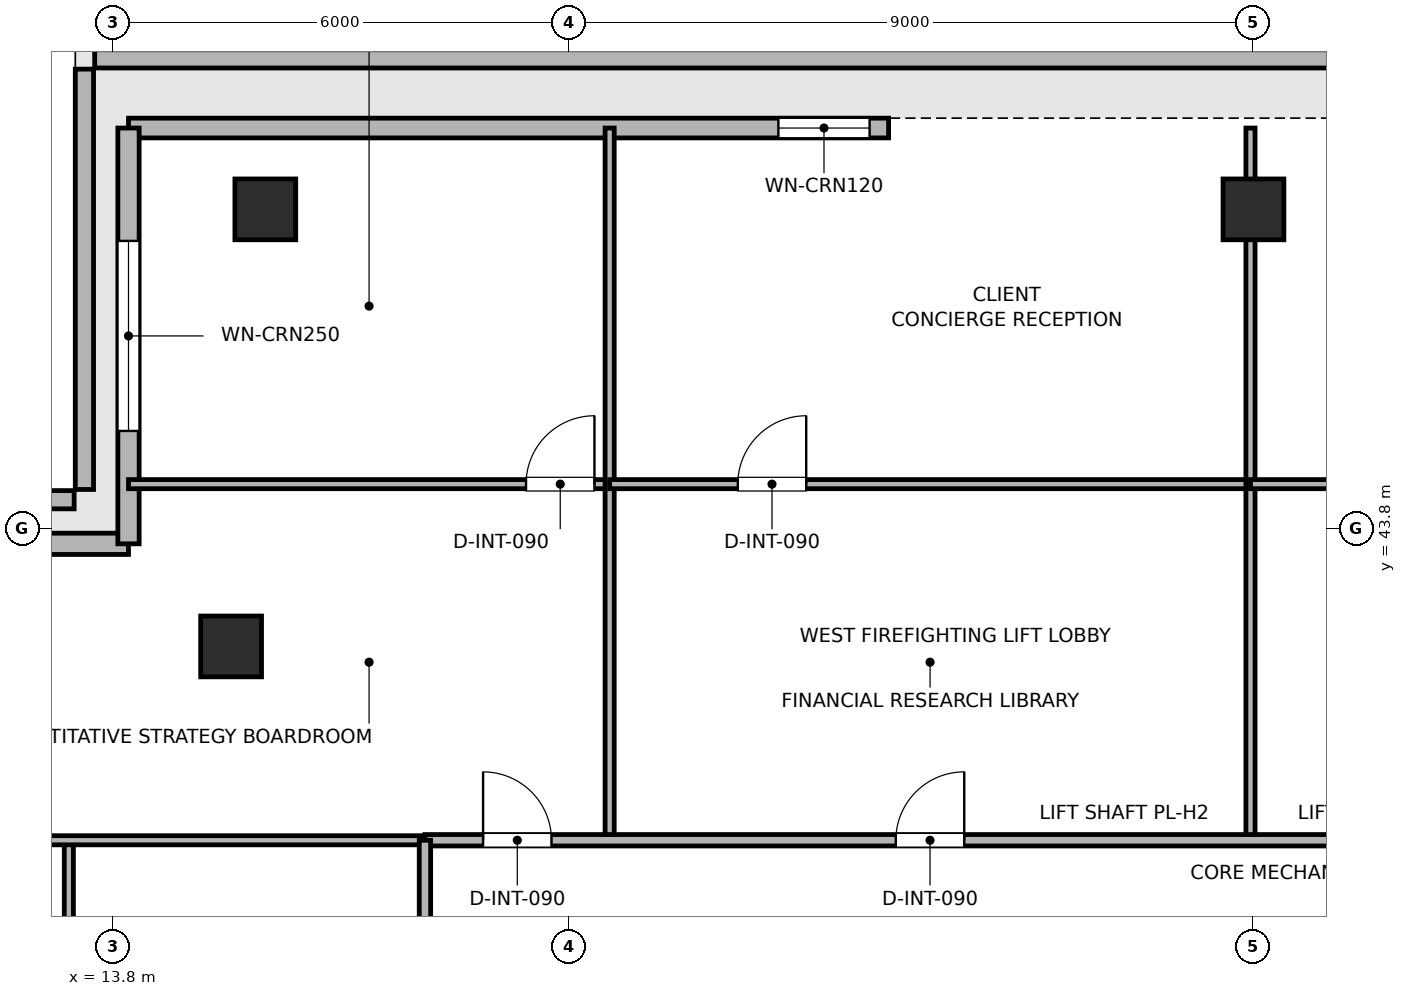
"""IFC4 building model, lengths in metres.
Left out: names, types, materials, properties, quantities, classifications, styles, units other than length and angle.
Written with IfcOpenShell. Run it as: python <this file> out.ifc"""

import sys

from ifc_helpers import new_model, si_unit, direction, frame, frame_2d, origin, origin_2d, place, context, subcontext, project, spatial, rectangle, extrude, element, fill, save


model = new_model("IFC4")
c1 = context("Model", 3, precision=1e-05, world=origin(), true_north=direction((0.0, 1.0)))
c2 = subcontext(c1, "Body", "Model", "MODEL_VIEW")
j1 = project(units=[si_unit("LENGTHUNIT", "METRE"), si_unit("PLANEANGLEUNIT", "RADIAN")], contexts=[c1])
p1 = place(None, origin())
s1 = spatial("IfcSite", under=j1, at=p1, CompositionType="ELEMENT")
p2 = place(p1, origin())
s2 = spatial("IfcBuilding", under=s1, at=p2, CompositionType="ELEMENT")
p3 = place(p2, frame((0.0, 0.0, 355.5)))
s3 = spatial("IfcBuildingStorey", under=s2, at=p3, CompositionType="ELEMENT", Elevation=355.5)
for number, where, z_axis, x_axis in (
    (1, (28.8, 48.0, 0.003), (0.0, 0.0, 1.0), (1.0, 0.0, 0.0)),
    (2, (15.8, 48.0, 0.003), (0.0, 0.0, 1.0), (1.0, 0.0, 0.0)),
    (3, (15.35, 42.25, 0.003), (0.0, 0.0, 1.0), (1.0, 0.0, 0.0)),
):
    element("IfcColumn", number, at=place(p3, frame(where, z_axis=z_axis, x_axis=x_axis)), inside=s3, PredefinedType="COLUMN", context=c2, shape_type="SweptSolid", body=[
        extrude(rectangle(XDim=0.8, YDim=0.8, at=origin_2d()), origin(), (0.0, 0.0, 1.0), 4.234),
    ])
p4 = place(p3, frame((44.045, 49.98, 0.0), z_axis=(0.0, 0.0, 1.0), x_axis=(-1.0, 0.0, 0.0)))
e4 = element("IfcWall", 4, at=p4, inside=s3, PredefinedType="PARAPET", context=c2, shape_type="SweptSolid", body=[
    extrude(rectangle(XDim=30.49, YDim=0.24, at=frame_2d((15.245, 0.0))), origin(), (0.0, 0.0, 1.0), 1.2),
])
for number, where, z_axis, x_axis in (
    (5, (13.42, 49.845, 0.0), (0.0, 0.0, 1.0), (0.0, -1.0, 0.0)),
    (6, (13.285, 44.18, 0.0), (0.0, 0.0, 1.0), (-1.0, 0.0, 0.0)),
):
    element("IfcWall", number, at=place(p3, frame(where, z_axis=z_axis, x_axis=x_axis)), inside=s3, PredefinedType="PARAPET", context=c2, shape_type="SweptSolid", body=[
        extrude(rectangle(XDim=5.53, YDim=0.24, at=frame_2d((2.765, 0.0))), origin(), (0.0, 0.0, 1.0), 1.2),
    ])
p5 = place(p3, frame((14.0, 49.07, 0.0), z_axis=(0.0, 0.0, 1.0), x_axis=(1.0, 0.0, 0.0)))
e7 = element("IfcWall", 7, at=p5, inside=s3, PredefinedType="SOLIDWALL", context=c2, shape_type="SweptSolid", body=[
    extrude(rectangle(XDim=10.0, YDim=0.26, at=frame_2d((5.0, 0.0))), origin(), (0.0, 0.0, 1.0), 4.24),
])
p6 = place(p5, frame((8.55, 0.0, 0.9)))
e8 = element("IfcOpeningElement", 8, at=p6, cuts=e7, PredefinedType="OPENING", context=c2, shape_type="SweptSolid", body=[
    extrude(rectangle(XDim=1.2, YDim=2.1, at=frame_2d((0.6, 1.05))), frame((0.0, 0.14, 0.0), z_axis=(0.0, -1.0, 0.0), x_axis=(1.0, 0.0, 0.0)), (0.0, 0.0, 1.0), 0.28),
])
p7 = place(p3, frame((8.53, 43.6, 0.0), z_axis=(0.0, 0.0, 1.0), x_axis=(1.0, 0.0, 0.0)))
e9 = element("IfcWall", 9, at=p7, inside=s3, PredefinedType="SOLIDWALL", context=c2, shape_type="SweptSolid", body=[
    extrude(rectangle(XDim=5.47, YDim=0.28, at=frame_2d((2.735, 0.0))), origin(), (0.0, 0.0, 1.0), 4.24),
])
p8 = place(p7, frame((1.485, 0.0, 0.9)))
e10 = element("IfcOpeningElement", 10, at=p8, cuts=e9, PredefinedType="OPENING", context=c2, shape_type="SweptSolid", body=[
    extrude(rectangle(XDim=2.5, YDim=1.9, at=frame_2d((1.25, 0.95))), frame((0.0, 0.15, 0.0), z_axis=(0.0, -1.0, 0.0), x_axis=(1.0, 0.0, 0.0)), (0.0, 0.0, 1.0), 0.3),
])
p9 = place(p3, frame((14.0, 43.6, 0.0), z_axis=(0.0, 0.0, 1.0), x_axis=(0.0, 1.0, 0.0)))
e11 = element("IfcWall", 11, at=p9, inside=s3, PredefinedType="SOLIDWALL", context=c2, shape_type="SweptSolid", body=[
    extrude(rectangle(XDim=5.47, YDim=0.28, at=frame_2d((2.735, 0.0))), origin(), (0.0, 0.0, 1.0), 4.24),
])
p10 = place(p9, frame((1.485, 0.0, 0.9)))
e12 = element("IfcOpeningElement", 12, at=p10, cuts=e11, PredefinedType="OPENING", context=c2, shape_type="SweptSolid", body=[
    extrude(rectangle(XDim=2.5, YDim=1.9, at=frame_2d((1.25, 0.95))), frame((0.0, 0.15, 0.0), z_axis=(0.0, -1.0, 0.0), x_axis=(1.0, 0.0, 0.0)), (0.0, 0.0, 1.0), 0.3),
])
p11 = place(p3, frame((14.0, 44.385, 0.0), z_axis=(0.0, 0.0, 1.0), x_axis=(1.0, 0.0, 0.0)))
e13 = element("IfcWall", 13, at=p11, inside=s3, PredefinedType="PARTITIONING", context=c2, shape_type="SweptSolid", body=[
    extrude(rectangle(XDim=6.33, YDim=0.12, at=frame_2d((3.165, 0.0))), origin(), (0.0, 0.0, 1.0), 3.825),
])
p12 = place(p11, frame((5.23, 0.0, 0.0)))
e14 = element("IfcOpeningElement", 14, at=p12, cuts=e13, PredefinedType="OPENING", context=c2, shape_type="SweptSolid", body=[
    extrude(rectangle(XDim=0.9, YDim=2.1, at=frame_2d((0.45, 1.05))), frame((0.0, 0.07, 0.0), z_axis=(0.0, -1.0, 0.0), x_axis=(1.0, 0.0, 0.0)), (0.0, 0.0, 1.0), 0.14),
])
p13 = place(p3, frame((20.33, 39.7, 0.0), z_axis=(0.0, 0.0, 1.0), x_axis=(0.0, 1.0, 0.0)))
e15 = element("IfcWall", 15, at=p13, inside=s3, PredefinedType="PARTITIONING", context=c2, shape_type="SweptSolid", body=[
    extrude(rectangle(XDim=9.37, YDim=0.12, at=frame_2d((4.685, 0.0))), origin(), (0.0, 0.0, 1.0), 3.825),
])
p14 = place(p3, frame((20.33, 44.385, 0.0), z_axis=(0.0, 0.0, 1.0), x_axis=(1.0, 0.0, 0.0)))
e16 = element("IfcWall", 16, at=p14, inside=s3, PredefinedType="PARTITIONING", context=c2, shape_type="SweptSolid", body=[
    extrude(rectangle(XDim=8.431, YDim=0.12, at=frame_2d((4.215, 0.0))), origin(), (0.0, 0.0, 1.0), 3.825),
])
p15 = place(p14, frame((1.686, 0.0, 0.0)))
e17 = element("IfcOpeningElement", 17, at=p15, cuts=e16, PredefinedType="OPENING", context=c2, shape_type="SweptSolid", body=[
    extrude(rectangle(XDim=0.9, YDim=2.1, at=frame_2d((0.45, 1.05))), frame((0.0, 0.07, 0.0), z_axis=(0.0, -1.0, 0.0), x_axis=(1.0, 0.0, 0.0)), (0.0, 0.0, 1.0), 0.14),
])
p16 = place(p3, frame((28.761, 39.7, 0.0), z_axis=(0.0, 0.0, 1.0), x_axis=(0.0, 1.0, 0.0)))
e18 = element("IfcWall", 18, at=p16, inside=s3, PredefinedType="PARTITIONING", context=c2, shape_type="SweptSolid", body=[
    extrude(rectangle(XDim=9.37, YDim=0.12, at=frame_2d((4.685, 0.0))), origin(), (0.0, 0.0, 1.0), 3.825),
])
p17 = place(p3, frame((28.761, 44.385, 0.0), z_axis=(0.0, 0.0, 1.0), x_axis=(1.0, 0.0, 0.0)))
e19 = element("IfcWall", 19, at=p17, inside=s3, PredefinedType="PARTITIONING", context=c2, shape_type="SweptSolid", body=[
    extrude(rectangle(XDim=14.839, YDim=0.12, at=frame_2d((7.419, 0.0))), origin(), (0.0, 0.0, 1.0), 3.825),
])
p18 = place(p17, frame((5.841, 0.0, 0.0)))
e20 = element("IfcOpeningElement", 20, at=p18, cuts=e19, PredefinedType="OPENING", context=c2, shape_type="SweptSolid", body=[
    extrude(rectangle(XDim=0.9, YDim=2.1, at=frame_2d((0.45, 1.05))), frame((0.0, 0.07, 0.0), z_axis=(0.0, -1.0, 0.0), x_axis=(1.0, 0.0, 0.0)), (0.0, 0.0, 1.0), 0.14),
])
p19 = place(p3, frame((13.215, 14.0, 0.0), z_axis=(0.0, 0.0, 1.0), x_axis=(0.0, 1.0, 0.0)))
e21 = element("IfcWall", 21, at=p19, inside=s3, PredefinedType="PARTITIONING", context=c2, shape_type="SweptSolid", body=[
    extrude(rectangle(XDim=25.7, YDim=0.12, at=frame_2d((12.85, 0.0))), origin(), (0.0, 0.0, 1.0), 3.825),
])
p20 = place(p19, frame((20.533, 0.0, 0.0)))
e22 = element("IfcOpeningElement", 22, at=p20, cuts=e21, PredefinedType="OPENING", context=c2, shape_type="SweptSolid", body=[
    extrude(rectangle(XDim=0.9, YDim=2.1, at=frame_2d((0.45, 1.05))), frame((0.0, 0.07, 0.0), z_axis=(0.0, -1.0, 0.0), x_axis=(1.0, 0.0, 0.0)), (0.0, 0.0, 1.0), 0.14),
])
p21 = place(p3, frame((8.53, 39.7, 0.0), z_axis=(0.0, 0.0, 1.0), x_axis=(1.0, 0.0, 0.0)))
e23 = element("IfcWall", 23, at=p21, inside=s3, PredefinedType="PARTITIONING", context=c2, shape_type="SweptSolid", body=[
    extrude(rectangle(XDim=9.37, YDim=0.12, at=frame_2d((4.685, 0.0))), origin(), (0.0, 0.0, 1.0), 3.825),
])
p22 = place(p3, frame((17.9, 39.7, 0.0), z_axis=(0.0, 0.0, 1.0), x_axis=(1.0, 0.0, 0.0)))
e24 = element("IfcWall", 24, at=p22, inside=s3, PredefinedType="PARTITIONING", context=c2, shape_type="SweptSolid", body=[
    extrude(rectangle(XDim=21.8, YDim=0.15, at=frame_2d((10.9, 0.0))), origin(), (0.0, 0.0, 1.0), 3.825),
])
p23 = place(p22, frame((0.765, 0.0, 0.0)))
e25 = element("IfcOpeningElement", 25, at=p23, cuts=e24, PredefinedType="OPENING", context=c2, shape_type="SweptSolid", body=[
    extrude(rectangle(XDim=0.9, YDim=2.1, at=frame_2d((0.45, 1.05))), frame((0.0, 0.085, 0.0), z_axis=(0.0, -1.0, 0.0), x_axis=(1.0, 0.0, 0.0)), (0.0, 0.0, 1.0), 0.17),
])
p24 = place(p22, frame((6.195, 0.0, 0.0)))
e26 = element("IfcOpeningElement", 26, at=p24, cuts=e24, PredefinedType="OPENING", context=c2, shape_type="SweptSolid", body=[
    extrude(rectangle(XDim=0.9, YDim=2.1, at=frame_2d((0.45, 1.05))), frame((0.0, 0.085, 0.0), z_axis=(0.0, -1.0, 0.0), x_axis=(1.0, 0.0, 0.0)), (0.0, 0.0, 1.0), 0.17),
])
p25 = place(p22, frame((15.88, 0.0, 0.0)))
e27 = element("IfcOpeningElement", 27, at=p25, cuts=e24, PredefinedType="OPENING", context=c2, shape_type="SweptSolid", body=[
    extrude(rectangle(XDim=0.9, YDim=2.1, at=frame_2d((0.45, 1.05))), frame((0.0, 0.085, 0.0), z_axis=(0.0, -1.0, 0.0), x_axis=(1.0, 0.0, 0.0)), (0.0, 0.0, 1.0), 0.17),
])
p26 = place(p3, frame((17.9, 14.0, 0.0), z_axis=(0.0, 0.0, 1.0), x_axis=(0.0, 1.0, 0.0)))
e28 = element("IfcWall", 28, at=p26, inside=s3, PredefinedType="PARTITIONING", context=c2, shape_type="SweptSolid", body=[
    extrude(rectangle(XDim=25.7, YDim=0.15, at=frame_2d((12.85, 0.0))), origin(), (0.0, 0.0, 1.0), 3.825),
])
p27 = place(p26, frame((12.4, 0.0, 0.0)))
e29 = element("IfcOpeningElement", 29, at=p27, cuts=e28, PredefinedType="OPENING", context=c2, shape_type="SweptSolid", body=[
    extrude(rectangle(XDim=0.9, YDim=2.1, at=frame_2d((0.45, 1.05))), frame((0.0, 0.085, 0.0), z_axis=(0.0, -1.0, 0.0), x_axis=(1.0, 0.0, 0.0)), (0.0, 0.0, 1.0), 0.17),
])
p28 = place(p6, origin())
e30 = element("IfcWindow", 30, at=p28, inside=s3, PartitioningType="SINGLE_PANEL", PredefinedType="WINDOW", context=c2, shape_type="SweptSolid", body=[
    extrude(rectangle(XDim=1.2, YDim=2.1, at=frame_2d((0.6, 1.05))), frame((0.0, 0.03, 0.0), z_axis=(0.0, -1.0, 0.0), x_axis=(1.0, 0.0, 0.0)), (0.0, 0.0, 1.0), 0.06),
])
fill(e8, e30)
p29 = place(p10, origin())
e31 = element("IfcWindow", 31, at=p29, inside=s3, PartitioningType="SINGLE_PANEL", PredefinedType="WINDOW", context=c2, shape_type="SweptSolid", body=[
    extrude(rectangle(XDim=2.5, YDim=1.9, at=frame_2d((1.25, 0.95))), frame((0.0, 0.03, 0.0), z_axis=(0.0, -1.0, 0.0), x_axis=(1.0, 0.0, 0.0)), (0.0, 0.0, 1.0), 0.06),
])
fill(e12, e31)
p30 = place(p12, origin())
e32 = element("IfcDoor", 32, at=p30, inside=s3, OperationType="SINGLE_SWING_RIGHT", PredefinedType="DOOR", context=c2, shape_type="SweptSolid", body=[
    extrude(rectangle(XDim=0.9, YDim=2.1, at=frame_2d((0.45, 1.05))), frame((0.0, 0.025, 0.0), z_axis=(0.0, -1.0, 0.0), x_axis=(1.0, 0.0, 0.0)), (0.0, 0.0, 1.0), 0.05),
])
fill(e14, e32)
p31 = place(p15, origin())
e33 = element("IfcDoor", 33, at=p31, inside=s3, OperationType="SINGLE_SWING_RIGHT", PredefinedType="DOOR", context=c2, shape_type="SweptSolid", body=[
    extrude(rectangle(XDim=0.9, YDim=2.1, at=frame_2d((0.45, 1.05))), frame((0.0, 0.025, 0.0), z_axis=(0.0, -1.0, 0.0), x_axis=(1.0, 0.0, 0.0)), (0.0, 0.0, 1.0), 0.05),
])
fill(e17, e33)
p32 = place(p23, origin())
e34 = element("IfcDoor", 34, at=p32, inside=s3, OperationType="SINGLE_SWING_LEFT", PredefinedType="DOOR", context=c2, shape_type="SweptSolid", body=[
    extrude(rectangle(XDim=0.9, YDim=2.1, at=frame_2d((0.45, 1.05))), frame((0.0, 0.025, 0.0), z_axis=(0.0, -1.0, 0.0), x_axis=(1.0, 0.0, 0.0)), (0.0, 0.0, 1.0), 0.05),
])
fill(e25, e34)
p33 = place(p24, origin())
e35 = element("IfcDoor", 35, at=p33, inside=s3, OperationType="SINGLE_SWING_RIGHT", PredefinedType="DOOR", context=c2, shape_type="SweptSolid", body=[
    extrude(rectangle(XDim=0.9, YDim=2.1, at=frame_2d((0.45, 1.05))), frame((0.0, 0.025, 0.0), z_axis=(0.0, -1.0, 0.0), x_axis=(1.0, 0.0, 0.0)), (0.0, 0.0, 1.0), 0.05),
])
fill(e26, e35)
save(model, sys.argv[1])
